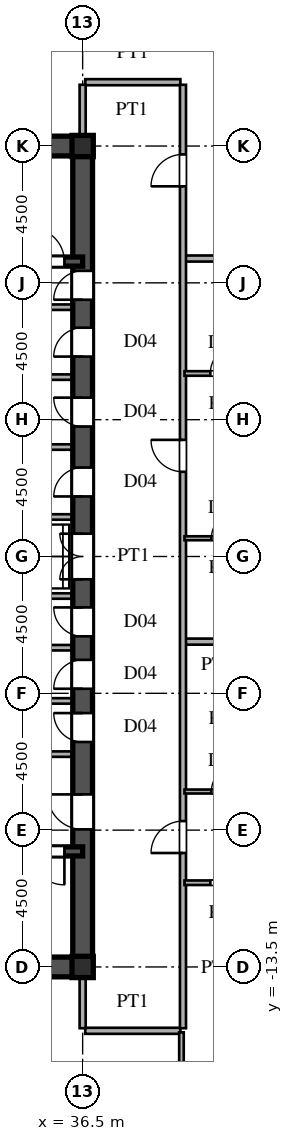
"""IFC4 building model, lengths in metres.
Left out: names, types, materials, properties, quantities, classifications, styles, units other than length and angle.
Written with IfcOpenShell. Run it as: python <this file> out.ifc"""

import sys

from ifc_helpers import new_model, si_unit, direction, frame, frame_2d, origin, origin_2d, place, context, subcontext, project, spatial, rectangle, i_section, extrude, source, transform, mapped, element, fill, save


model = new_model("IFC4")
c1 = context("Model", 3, precision=1e-05, world=origin(), true_north=direction((0.0, 1.0)))
c2 = subcontext(c1, "Body", "Model", "MODEL_VIEW")
j1 = project(units=[si_unit("LENGTHUNIT", "METRE"), si_unit("PLANEANGLEUNIT", "RADIAN")], contexts=[c1])
p1 = place(None, origin())
s1 = spatial("IfcSite", under=j1, at=p1, CompositionType="ELEMENT")
p2 = place(p1, origin())
s2 = spatial("IfcBuilding", under=s1, at=p2, CompositionType="ELEMENT")
p3 = place(p2, frame((0.0, 0.0, 121.2)))
s3 = spatial("IfcBuildingStorey", under=s2, at=p3, CompositionType="ELEMENT", Elevation=121.2)
m1 = source(origin(), c2, "Body", "SweptSolid", [
    extrude(i_section(OverallWidth=0.7, OverallDepth=0.7, WebThickness=0.028, FlangeThickness=0.045, at=origin_2d()), origin(), (0.0, 0.0, 1.0), 3.6),
])
for number, where, z_axis, x_axis in (
    (1, (36.5, -13.5, 0.0), (0.0, 0.0, 1.0), (1.0, 0.0, 0.0)),
    (2, (36.5, 13.5, 0.0), (0.0, 0.0, 1.0), (1.0, 0.0, 0.0)),
):
    element("IfcColumn", number, at=place(p3, frame(where, z_axis=z_axis, x_axis=x_axis)), inside=s3, PredefinedType="COLUMN", context=c2, shape_type="MappedRepresentation", body=[
        mapped(m1, transform((0.0, 0.0, 0.0), scale=1.0)),
    ])
for number, where, z_axis, x_axis in (
    (3, (27.5, -13.5, 0.0), (0.0, 0.0, 1.0), (1.0, 0.0, 0.0)),
    (4, (27.5, 13.5, 0.0), (0.0, 0.0, 1.0), (1.0, 0.0, 0.0)),
):
    element("IfcWall", number, at=place(p3, frame(where, z_axis=z_axis, x_axis=x_axis)), inside=s3, PredefinedType="SHEAR", context=c2, shape_type="SweptSolid", body=[
        extrude(rectangle(XDim=9.0, YDim=0.65, at=frame_2d((4.5, 0.0))), origin(), (0.0, 0.0, 1.0), 3.38),
    ])
p4 = place(p3, frame((36.5, -13.65, 0.0), z_axis=(0.0, 0.0, 1.0), x_axis=(0.0, 1.0, 0.0)))
e5 = element("IfcWall", 5, at=p4, inside=s3, PredefinedType="SHEAR", context=c2, shape_type="SweptSolid", body=[
    extrude(rectangle(XDim=7.15, YDim=0.65, at=frame_2d((3.575, 0.0))), origin(), (0.0, 0.0, 1.0), 3.38),
])
p5 = place(p4, frame((4.675, 0.0, 0.0)))
e6 = element("IfcOpeningElement", 6, at=p5, cuts=e5, PredefinedType="OPENING", context=c2, shape_type="SweptSolid", body=[
    extrude(rectangle(XDim=1.15, YDim=2.2, at=frame_2d((0.575, 1.1))), frame((0.0, 0.335, 0.0), z_axis=(0.0, -1.0, 0.0), x_axis=(1.0, 0.0, 0.0)), (0.0, 0.0, 1.0), 0.67),
])
p6 = place(p3, frame((36.5, -1.3, 0.0), z_axis=(0.0, 0.0, 1.0), x_axis=(0.0, 1.0, 0.0)))
e7 = element("IfcWall", 7, at=p6, inside=s3, PredefinedType="SHEAR", context=c2, shape_type="SweptSolid", body=[
    extrude(rectangle(XDim=2.6, YDim=0.65, at=frame_2d((1.3, 0.0))), origin(), (0.0, 0.0, 1.0), 3.38),
])
p7 = place(p6, frame((0.55, 0.0, 0.0)))
e8 = element("IfcOpeningElement", 8, at=p7, cuts=e7, PredefinedType="OPENING", context=c2, shape_type="SweptSolid", body=[
    extrude(rectangle(XDim=1.5, YDim=2.3, at=frame_2d((0.75, 1.15))), frame((0.0, 0.335, 0.0), z_axis=(0.0, -1.0, 0.0), x_axis=(1.0, 0.0, 0.0)), (0.0, 0.0, 1.0), 0.67),
])
p8 = place(p3, frame((36.5, 8.2, 0.0), z_axis=(0.0, 0.0, 1.0), x_axis=(0.0, 1.0, 0.0)))
e9 = element("IfcWall", 9, at=p8, inside=s3, PredefinedType="SHEAR", context=c2, shape_type="SweptSolid", body=[
    extrude(rectangle(XDim=5.45, YDim=0.65, at=frame_2d((2.725, 0.0))), origin(), (0.0, 0.0, 1.0), 3.38),
])
p9 = place(p8, frame((0.245, 0.0, 0.0)))
e10 = element("IfcOpeningElement", 10, at=p9, cuts=e9, PredefinedType="OPENING", context=c2, shape_type="SweptSolid", body=[
    extrude(rectangle(XDim=0.95, YDim=2.15, at=frame_2d((0.475, 1.075))), frame((0.0, 0.335, 0.0), z_axis=(0.0, -1.0, 0.0), x_axis=(1.0, 0.0, 0.0)), (0.0, 0.0, 1.0), 0.67),
])
p10 = place(p3, frame((36.5, -6.5, 0.0), z_axis=(0.0, 0.0, 1.0), x_axis=(0.0, 1.0, 0.0)))
e11 = element("IfcWall", 11, at=p10, inside=s3, PredefinedType="SHEAR", context=c2, shape_type="SweptSolid", body=[
    extrude(rectangle(XDim=1.75, YDim=0.65, at=frame_2d((0.875, 0.0))), origin(), (0.0, 0.0, 1.0), 3.38),
])
p11 = place(p10, frame((0.4, 0.0, 0.0)))
e12 = element("IfcOpeningElement", 12, at=p11, cuts=e11, PredefinedType="OPENING", context=c2, shape_type="SweptSolid", body=[
    extrude(rectangle(XDim=0.95, YDim=2.15, at=frame_2d((0.475, 1.075))), frame((0.0, 0.335, 0.0), z_axis=(0.0, -1.0, 0.0), x_axis=(1.0, 0.0, 0.0)), (0.0, 0.0, 1.0), 0.67),
])
p12 = place(p3, frame((36.5, -4.75, 0.0), z_axis=(0.0, 0.0, 1.0), x_axis=(0.0, 1.0, 0.0)))
e13 = element("IfcWall", 13, at=p12, inside=s3, PredefinedType="SHEAR", context=c2, shape_type="SweptSolid", body=[
    extrude(rectangle(XDim=1.75, YDim=0.65, at=frame_2d((0.875, 0.0))), origin(), (0.0, 0.0, 1.0), 3.38),
])
p13 = place(p12, frame((0.4, 0.0, 0.0)))
e14 = element("IfcOpeningElement", 14, at=p13, cuts=e13, PredefinedType="OPENING", context=c2, shape_type="SweptSolid", body=[
    extrude(rectangle(XDim=0.95, YDim=2.15, at=frame_2d((0.475, 1.075))), frame((0.0, 0.335, 0.0), z_axis=(0.0, -1.0, 0.0), x_axis=(1.0, 0.0, 0.0)), (0.0, 0.0, 1.0), 0.67),
])
p14 = place(p3, frame((36.5, -3.0, 0.0), z_axis=(0.0, 0.0, 1.0), x_axis=(0.0, 1.0, 0.0)))
e15 = element("IfcWall", 15, at=p14, inside=s3, PredefinedType="SHEAR", context=c2, shape_type="SweptSolid", body=[
    extrude(rectangle(XDim=1.7, YDim=0.65, at=frame_2d((0.85, 0.0))), origin(), (0.0, 0.0, 1.0), 3.38),
])
p15 = place(p14, frame((0.375, 0.0, 0.0)))
e16 = element("IfcOpeningElement", 16, at=p15, cuts=e15, PredefinedType="OPENING", context=c2, shape_type="SweptSolid", body=[
    extrude(rectangle(XDim=0.95, YDim=2.15, at=frame_2d((0.475, 1.075))), frame((0.0, 0.335, 0.0), z_axis=(0.0, -1.0, 0.0), x_axis=(1.0, 0.0, 0.0)), (0.0, 0.0, 1.0), 0.67),
])
p16 = place(p3, frame((36.5, 1.3, 0.0), z_axis=(0.0, 0.0, 1.0), x_axis=(0.0, 1.0, 0.0)))
e17 = element("IfcWall", 17, at=p16, inside=s3, PredefinedType="SHEAR", context=c2, shape_type="SweptSolid", body=[
    extrude(rectangle(XDim=2.3, YDim=0.65, at=frame_2d((1.15, 0.0))), origin(), (0.0, 0.0, 1.0), 3.38),
])
p17 = place(p16, frame((0.675, 0.0, 0.0)))
e18 = element("IfcOpeningElement", 18, at=p17, cuts=e17, PredefinedType="OPENING", context=c2, shape_type="SweptSolid", body=[
    extrude(rectangle(XDim=0.95, YDim=2.15, at=frame_2d((0.475, 1.075))), frame((0.0, 0.335, 0.0), z_axis=(0.0, -1.0, 0.0), x_axis=(1.0, 0.0, 0.0)), (0.0, 0.0, 1.0), 0.67),
])
p18 = place(p3, frame((36.5, 3.6, 0.0), z_axis=(0.0, 0.0, 1.0), x_axis=(0.0, 1.0, 0.0)))
e19 = element("IfcWall", 19, at=p18, inside=s3, PredefinedType="SHEAR", context=c2, shape_type="SweptSolid", body=[
    extrude(rectangle(XDim=2.3, YDim=0.65, at=frame_2d((1.15, 0.0))), origin(), (0.0, 0.0, 1.0), 3.38),
])
p19 = place(p18, frame((0.675, 0.0, 0.0)))
e20 = element("IfcOpeningElement", 20, at=p19, cuts=e19, PredefinedType="OPENING", context=c2, shape_type="SweptSolid", body=[
    extrude(rectangle(XDim=0.95, YDim=2.15, at=frame_2d((0.475, 1.075))), frame((0.0, 0.335, 0.0), z_axis=(0.0, -1.0, 0.0), x_axis=(1.0, 0.0, 0.0)), (0.0, 0.0, 1.0), 0.67),
])
p20 = place(p3, frame((36.5, 5.9, 0.0), z_axis=(0.0, 0.0, 1.0), x_axis=(0.0, 1.0, 0.0)))
e21 = element("IfcWall", 21, at=p20, inside=s3, PredefinedType="SHEAR", context=c2, shape_type="SweptSolid", body=[
    extrude(rectangle(XDim=2.3, YDim=0.65, at=frame_2d((1.15, 0.0))), origin(), (0.0, 0.0, 1.0), 3.38),
])
p21 = place(p20, frame((0.675, 0.0, 0.0)))
e22 = element("IfcOpeningElement", 22, at=p21, cuts=e21, PredefinedType="OPENING", context=c2, shape_type="SweptSolid", body=[
    extrude(rectangle(XDim=0.95, YDim=2.15, at=frame_2d((0.475, 1.075))), frame((0.0, 0.335, 0.0), z_axis=(0.0, -1.0, 0.0), x_axis=(1.0, 0.0, 0.0)), (0.0, 0.0, 1.0), 0.67),
])
p22 = place(p3, frame((27.5, -9.7, 0.0), z_axis=(0.0, 0.0, 1.0), x_axis=(1.0, 0.0, 0.0)))
e23 = element("IfcWall", 23, at=p22, inside=s3, PredefinedType="SHEAR", context=c2, shape_type="SweptSolid", body=[
    extrude(rectangle(XDim=9.0, YDim=0.3, at=frame_2d((4.5, 0.0))), origin(), (0.0, 0.0, 1.0), 3.38),
])
p23 = place(p22, frame((7.3, 0.0, 0.0)))
e24 = element("IfcOpeningElement", 24, at=p23, cuts=e23, PredefinedType="OPENING", context=c2, shape_type="SweptSolid", body=[
    extrude(rectangle(XDim=1.1, YDim=2.2, at=frame_2d((0.55, 1.1))), frame((0.0, 0.16, 0.0), z_axis=(0.0, -1.0, 0.0), x_axis=(1.0, 0.0, 0.0)), (0.0, 0.0, 1.0), 0.32),
])
p24 = place(p3, frame((27.5, 9.7, 0.0), z_axis=(0.0, 0.0, 1.0), x_axis=(1.0, 0.0, 0.0)))
e25 = element("IfcWall", 25, at=p24, inside=s3, PredefinedType="SHEAR", context=c2, shape_type="SweptSolid", body=[
    extrude(rectangle(XDim=9.0, YDim=0.3, at=frame_2d((4.5, 0.0))), origin(), (0.0, 0.0, 1.0), 3.38),
])
p25 = place(p24, frame((7.3, 0.0, 0.0)))
e26 = element("IfcOpeningElement", 26, at=p25, cuts=e25, PredefinedType="OPENING", context=c2, shape_type="SweptSolid", body=[
    extrude(rectangle(XDim=1.1, YDim=2.2, at=frame_2d((0.55, 1.1))), frame((0.0, 0.16, 0.0), z_axis=(0.0, -1.0, 0.0), x_axis=(1.0, 0.0, 0.0)), (0.0, 0.0, 1.0), 0.32),
])
for number, where, z_axis, x_axis in (
    (27, (30.45, -6.5, 0.0), (0.0, 0.0, 1.0), (1.0, 0.0, 0.0)),
    (28, (30.45, 8.2, 0.0), (0.0, 0.0, 1.0), (1.0, 0.0, 0.0)),
):
    element("IfcWall", number, at=place(p3, frame(where, z_axis=z_axis, x_axis=x_axis)), inside=s3, PredefinedType="PARTITIONING", context=c2, shape_type="SweptSolid", body=[
        extrude(rectangle(XDim=5.7, YDim=0.18, at=frame_2d((2.85, 0.0))), origin(), (0.0, 0.0, 1.0), 3.38),
    ])
for number, where, z_axis, x_axis in (
    (29, (33.2, -1.3, 0.0), (0.0, 0.0, 1.0), (1.0, 0.0, 0.0)),
    (30, (33.2, 1.3, 0.0), (0.0, 0.0, 1.0), (1.0, 0.0, 0.0)),
    (31, (33.2, -4.75, 0.0), (0.0, 0.0, 1.0), (1.0, 0.0, 0.0)),
    (32, (33.2, -3.0, 0.0), (0.0, 0.0, 1.0), (1.0, 0.0, 0.0)),
    (33, (33.2, 3.6, 0.0), (0.0, 0.0, 1.0), (1.0, 0.0, 0.0)),
    (34, (33.2, 5.9, 0.0), (0.0, 0.0, 1.0), (1.0, 0.0, 0.0)),
):
    element("IfcWall", number, at=place(p3, frame(where, z_axis=z_axis, x_axis=x_axis)), inside=s3, PredefinedType="PARTITIONING", context=c2, shape_type="SweptSolid", body=[
        extrude(rectangle(XDim=2.95, YDim=0.18, at=frame_2d((1.475, 0.0))), origin(), (0.0, 0.0, 1.0), 3.38),
    ])
p26 = place(p3, frame((36.585, -15.6, 0.0), z_axis=(0.0, 0.0, 1.0), x_axis=(1.0, 0.0, 0.0)))
e35 = element("IfcWall", 35, at=p26, inside=s3, PredefinedType="PARTITIONING", context=c2, shape_type="SweptSolid", body=[
    extrude(rectangle(XDim=3.13, YDim=0.2, at=frame_2d((1.565, 0.0))), origin(), (0.0, 0.0, 1.0), 3.38),
])
p27 = place(p3, frame((39.85, -10.73, 0.0), z_axis=(0.0, 0.0, 1.0), x_axis=(1.0, 0.0, 0.0)))
e36 = element("IfcWall", 36, at=p27, inside=s3, PredefinedType="PARTITIONING", context=c2, shape_type="SweptSolid", body=[
    extrude(rectangle(XDim=2.65, YDim=0.15, at=frame_2d((1.325, 0.0))), origin(), (0.0, 0.0, 1.0), 3.38),
])
p28 = place(p27, frame((0.85, 0.0, 0.0)))
e37 = element("IfcOpeningElement", 37, at=p28, cuts=e36, PredefinedType="OPENING", context=c2, shape_type="SweptSolid", body=[
    extrude(rectangle(XDim=0.95, YDim=2.15, at=frame_2d((0.475, 1.075))), frame((0.0, 0.085, 0.0), z_axis=(0.0, -1.0, 0.0), x_axis=(1.0, 0.0, 0.0)), (0.0, 0.0, 1.0), 0.17),
])
p29 = place(p3, frame((39.85, -7.73, 0.0), z_axis=(0.0, 0.0, 1.0), x_axis=(1.0, 0.0, 0.0)))
e38 = element("IfcWall", 38, at=p29, inside=s3, PredefinedType="PARTITIONING", context=c2, shape_type="SweptSolid", body=[
    extrude(rectangle(XDim=2.65, YDim=0.13, at=frame_2d((1.325, 0.0))), origin(), (0.0, 0.0, 1.0), 3.38),
])
p30 = place(p29, frame((0.885, 0.0, 0.0)))
e39 = element("IfcOpeningElement", 39, at=p30, cuts=e38, PredefinedType="OPENING", context=c2, shape_type="SweptSolid", body=[
    extrude(rectangle(XDim=0.88, YDim=2.1, at=frame_2d((0.44, 1.05))), frame((0.0, 0.075, 0.0), z_axis=(0.0, -1.0, 0.0), x_axis=(1.0, 0.0, 0.0)), (0.0, 0.0, 1.0), 0.15),
])
p31 = place(p3, frame((39.88, -2.8, 0.0), z_axis=(0.0, 0.0, 1.0), x_axis=(1.0, 0.0, 0.0)))
e40 = element("IfcWall", 40, at=p31, inside=s3, PredefinedType="PARTITIONING", context=c2, shape_type="SweptSolid", body=[
    extrude(rectangle(XDim=29.625, YDim=0.2, at=frame_2d((14.812, 0.0))), origin(), (0.0, 0.0, 1.0), 3.38),
])
p32 = place(p3, frame((39.85, 0.6, 0.0), z_axis=(0.0, 0.0, 1.0), x_axis=(1.0, 0.0, 0.0)))
e41 = element("IfcWall", 41, at=p32, inside=s3, PredefinedType="PARTITIONING", context=c2, shape_type="SweptSolid", body=[
    extrude(rectangle(XDim=2.65, YDim=0.13, at=frame_2d((1.325, 0.0))), origin(), (0.0, 0.0, 1.0), 3.38),
])
p33 = place(p32, frame((0.885, 0.0, 0.0)))
e42 = element("IfcOpeningElement", 42, at=p33, cuts=e41, PredefinedType="OPENING", context=c2, shape_type="SweptSolid", body=[
    extrude(rectangle(XDim=0.88, YDim=2.1, at=frame_2d((0.44, 1.05))), frame((0.0, 0.075, 0.0), z_axis=(0.0, -1.0, 0.0), x_axis=(1.0, 0.0, 0.0)), (0.0, 0.0, 1.0), 0.15),
])
p34 = place(p3, frame((39.85, 6.02, 0.0), z_axis=(0.0, 0.0, 1.0), x_axis=(1.0, 0.0, 0.0)))
e43 = element("IfcWall", 43, at=p34, inside=s3, PredefinedType="PARTITIONING", context=c2, shape_type="SweptSolid", body=[
    extrude(rectangle(XDim=2.65, YDim=0.15, at=frame_2d((1.325, 0.0))), origin(), (0.0, 0.0, 1.0), 3.38),
])
p35 = place(p34, frame((0.85, 0.0, 0.0)))
e44 = element("IfcOpeningElement", 44, at=p35, cuts=e43, PredefinedType="OPENING", context=c2, shape_type="SweptSolid", body=[
    extrude(rectangle(XDim=0.95, YDim=2.15, at=frame_2d((0.475, 1.075))), frame((0.0, 0.085, 0.0), z_axis=(0.0, -1.0, 0.0), x_axis=(1.0, 0.0, 0.0)), (0.0, 0.0, 1.0), 0.17),
])
p36 = place(p3, frame((39.88, 9.8, 0.0), z_axis=(0.0, 0.0, 1.0), x_axis=(1.0, 0.0, 0.0)))
e45 = element("IfcWall", 45, at=p36, inside=s3, PredefinedType="PARTITIONING", context=c2, shape_type="SweptSolid", body=[
    extrude(rectangle(XDim=20.277, YDim=0.2, at=frame_2d((10.139, 0.0))), origin(), (0.0, 0.0, 1.0), 3.38),
])
p37 = place(p3, frame((36.585, 15.6, 0.0), z_axis=(0.0, 0.0, 1.0), x_axis=(1.0, 0.0, 0.0)))
e46 = element("IfcWall", 46, at=p37, inside=s3, PredefinedType="PARTITIONING", context=c2, shape_type="SweptSolid", body=[
    extrude(rectangle(XDim=3.13, YDim=0.2, at=frame_2d((1.565, 0.0))), origin(), (0.0, 0.0, 1.0), 3.38),
])
for number, where, z_axis, x_axis in (
    (47, (36.5, -15.515, 0.0), (0.0, 0.0, 1.0), (0.0, 1.0, 0.0)),
    (48, (36.5, 13.83, 0.0), (0.0, 0.0, 1.0), (0.0, 1.0, 0.0)),
):
    element("IfcWall", number, at=place(p3, frame(where, z_axis=z_axis, x_axis=x_axis)), inside=s3, PredefinedType="PARTITIONING", context=c2, shape_type="SweptSolid", body=[
        extrude(rectangle(XDim=1.685, YDim=0.2, at=frame_2d((0.842, 0.0))), origin(), (0.0, 0.0, 1.0), 2.78),
    ])
p38 = place(p3, frame((39.75, -20.301, 0.0), z_axis=(0.0, 0.0, 1.0), x_axis=(0.0, 1.0, 0.0)))
e49 = element("IfcWall", 49, at=p38, inside=s3, PredefinedType="PARTITIONING", context=c2, shape_type="SweptSolid", body=[
    extrude(rectangle(XDim=4.651, YDim=0.15, at=frame_2d((2.326, 0.0))), origin(), (0.0, 0.0, 1.0), 3.38),
])
p39 = place(p38, frame((2.526, 0.0, 0.0)))
e50 = element("IfcOpeningElement", 50, at=p39, cuts=e49, PredefinedType="OPENING", context=c2, shape_type="SweptSolid", body=[
    extrude(rectangle(XDim=0.95, YDim=2.15, at=frame_2d((0.475, 1.075))), frame((0.0, 0.085, 0.0), z_axis=(0.0, -1.0, 0.0), x_axis=(1.0, 0.0, 0.0)), (0.0, 0.0, 1.0), 0.17),
])
p40 = place(p3, frame((39.8, -15.515, 0.0), z_axis=(0.0, 0.0, 1.0), x_axis=(0.0, 1.0, 0.0)))
e51 = element("IfcWall", 51, at=p40, inside=s3, PredefinedType="PARTITIONING", context=c2, shape_type="SweptSolid", body=[
    extrude(rectangle(XDim=31.03, YDim=0.2, at=frame_2d((15.515, 0.0))), origin(), (0.0, 0.0, 1.0), 3.38),
])
p41 = place(p40, frame((5.762, 0.0, 0.0)))
e52 = element("IfcOpeningElement", 52, at=p41, cuts=e51, PredefinedType="OPENING", context=c2, shape_type="SweptSolid", body=[
    extrude(rectangle(XDim=1.05, YDim=2.25, at=frame_2d((0.525, 1.125))), frame((0.0, 0.11, 0.0), z_axis=(0.0, -1.0, 0.0), x_axis=(1.0, 0.0, 0.0)), (0.0, 0.0, 1.0), 0.22),
])
p42 = place(p40, frame((18.301, 0.0, 0.0)))
e53 = element("IfcOpeningElement", 53, at=p42, cuts=e51, PredefinedType="OPENING", context=c2, shape_type="SweptSolid", body=[
    extrude(rectangle(XDim=1.05, YDim=2.25, at=frame_2d((0.525, 1.125))), frame((0.0, 0.11, 0.0), z_axis=(0.0, -1.0, 0.0), x_axis=(1.0, 0.0, 0.0)), (0.0, 0.0, 1.0), 0.22),
])
p43 = place(p40, frame((27.69, 0.0, 0.0)))
e54 = element("IfcOpeningElement", 54, at=p43, cuts=e51, PredefinedType="OPENING", context=c2, shape_type="SweptSolid", body=[
    extrude(rectangle(XDim=1.05, YDim=2.25, at=frame_2d((0.525, 1.125))), frame((0.0, 0.11, 0.0), z_axis=(0.0, -1.0, 0.0), x_axis=(1.0, 0.0, 0.0)), (0.0, 0.0, 1.0), 0.22),
])
m2 = source(origin(), c2, "Body", "SweptSolid", [
    extrude(rectangle(XDim=1.15, YDim=2.2, at=frame_2d((0.575, 1.1))), frame((0.0, 0.025, 0.0), z_axis=(0.0, -1.0, 0.0), x_axis=(1.0, 0.0, 0.0)), (0.0, 0.0, 1.0), 0.05),
])
p44 = place(p5, origin())
e55 = element("IfcDoor", 55, at=p44, inside=s3, OperationType="SINGLE_SWING_RIGHT", PredefinedType="DOOR", context=c2, shape_type="MappedRepresentation", body=[
    mapped(m2, transform((0.0, 0.0, 0.0), scale=1.0)),
])
fill(e6, e55)
m3 = source(origin(), c2, "Body", "SweptSolid", [
    extrude(rectangle(XDim=1.5, YDim=2.3, at=frame_2d((0.75, 1.15))), frame((0.0, 0.025, 0.0), z_axis=(0.0, -1.0, 0.0), x_axis=(1.0, 0.0, 0.0)), (0.0, 0.0, 1.0), 0.05),
])
p45 = place(p7, origin())
e56 = element("IfcDoor", 56, at=p45, inside=s3, OperationType="DOUBLE_SWING_LEFT", PredefinedType="DOOR", context=c2, shape_type="MappedRepresentation", body=[
    mapped(m3, transform((0.0, 0.0, 0.0), scale=1.0)),
])
fill(e8, e56)
m4 = source(origin(), c2, "Body", "SweptSolid", [
    extrude(rectangle(XDim=0.95, YDim=2.15, at=frame_2d((0.475, 1.075))), frame((0.0, 0.025, 0.0), z_axis=(0.0, -1.0, 0.0), x_axis=(1.0, 0.0, 0.0)), (0.0, 0.0, 1.0), 0.05),
])
p46 = place(p9, origin())
e57 = element("IfcDoor", 57, at=p46, inside=s3, OperationType="SINGLE_SWING_LEFT", PredefinedType="DOOR", context=c2, shape_type="MappedRepresentation", body=[
    mapped(m4, transform((0.0, 0.0, 0.0), scale=1.0)),
])
fill(e10, e57)
p47 = place(p11, origin())
e58 = element("IfcDoor", 58, at=p47, inside=s3, OperationType="SINGLE_SWING_RIGHT", PredefinedType="DOOR", context=c2, shape_type="MappedRepresentation", body=[
    mapped(m4, transform((0.0, 0.0, 0.0), scale=1.0)),
])
fill(e12, e58)
p48 = place(p13, origin())
e59 = element("IfcDoor", 59, at=p48, inside=s3, OperationType="SINGLE_SWING_LEFT", PredefinedType="DOOR", context=c2, shape_type="MappedRepresentation", body=[
    mapped(m4, transform((0.0, 0.0, 0.0), scale=1.0)),
])
fill(e14, e59)
p49 = place(p15, origin())
e60 = element("IfcDoor", 60, at=p49, inside=s3, OperationType="SINGLE_SWING_RIGHT", PredefinedType="DOOR", context=c2, shape_type="MappedRepresentation", body=[
    mapped(m4, transform((0.0, 0.0, 0.0), scale=1.0)),
])
fill(e16, e60)
p50 = place(p17, origin())
e61 = element("IfcDoor", 61, at=p50, inside=s3, OperationType="SINGLE_SWING_LEFT", PredefinedType="DOOR", context=c2, shape_type="MappedRepresentation", body=[
    mapped(m4, transform((0.0, 0.0, 0.0), scale=1.0)),
])
fill(e18, e61)
p51 = place(p19, origin())
e62 = element("IfcDoor", 62, at=p51, inside=s3, OperationType="SINGLE_SWING_RIGHT", PredefinedType="DOOR", context=c2, shape_type="MappedRepresentation", body=[
    mapped(m4, transform((0.0, 0.0, 0.0), scale=1.0)),
])
fill(e20, e62)
p52 = place(p21, origin())
e63 = element("IfcDoor", 63, at=p52, inside=s3, OperationType="SINGLE_SWING_LEFT", PredefinedType="DOOR", context=c2, shape_type="MappedRepresentation", body=[
    mapped(m4, transform((0.0, 0.0, 0.0), scale=1.0)),
])
fill(e22, e63)
m5 = source(origin(), c2, "Body", "SweptSolid", [
    extrude(rectangle(XDim=1.1, YDim=2.2, at=frame_2d((0.55, 1.1))), frame((0.0, 0.025, 0.0), z_axis=(0.0, -1.0, 0.0), x_axis=(1.0, 0.0, 0.0)), (0.0, 0.0, 1.0), 0.05),
])
p53 = place(p23, frame((1.1, 0.0, 0.0), z_axis=(0.0, 0.0, 1.0), x_axis=(-1.0, 0.0, 0.0)))
e64 = element("IfcDoor", 64, at=p53, inside=s3, OperationType="SINGLE_SWING_RIGHT", PredefinedType="DOOR", context=c2, shape_type="MappedRepresentation", body=[
    mapped(m5, transform((0.0, 0.0, 0.0), scale=1.0)),
])
fill(e24, e64)
p54 = place(p25, origin())
e65 = element("IfcDoor", 65, at=p54, inside=s3, OperationType="SINGLE_SWING_LEFT", PredefinedType="DOOR", context=c2, shape_type="MappedRepresentation", body=[
    mapped(m5, transform((0.0, 0.0, 0.0), scale=1.0)),
])
fill(e26, e65)
m6 = source(origin(), c2, "Body", "SweptSolid", [
    extrude(rectangle(XDim=0.88, YDim=2.1, at=frame_2d((0.44, 1.05))), frame((0.0, 0.025, 0.0), z_axis=(0.0, -1.0, 0.0), x_axis=(1.0, 0.0, 0.0)), (0.0, 0.0, 1.0), 0.05),
])
p55 = place(p30, origin())
e66 = element("IfcDoor", 66, at=p55, inside=s3, OperationType="SINGLE_SWING_RIGHT", PredefinedType="DOOR", context=c2, shape_type="MappedRepresentation", body=[
    mapped(m6, transform((0.0, 0.0, 0.0), scale=1.0)),
])
fill(e39, e66)
p56 = place(p33, origin())
e67 = element("IfcDoor", 67, at=p56, inside=s3, OperationType="SINGLE_SWING_RIGHT", PredefinedType="DOOR", context=c2, shape_type="MappedRepresentation", body=[
    mapped(m6, transform((0.0, 0.0, 0.0), scale=1.0)),
])
fill(e42, e67)
m7 = source(origin(), c2, "Body", "SweptSolid", [
    extrude(rectangle(XDim=0.95, YDim=2.15, at=frame_2d((0.475, 1.075))), frame((0.0, 0.025, 0.0), z_axis=(0.0, -1.0, 0.0), x_axis=(1.0, 0.0, 0.0)), (0.0, 0.0, 1.0), 0.05),
])
p57 = place(p35, origin())
e68 = element("IfcDoor", 68, at=p57, inside=s3, OperationType="SINGLE_SWING_RIGHT", PredefinedType="DOOR", context=c2, shape_type="MappedRepresentation", body=[
    mapped(m7, transform((0.0, 0.0, 0.0), scale=1.0)),
])
fill(e44, e68)
m8 = source(origin(), c2, "Body", "SweptSolid", [
    extrude(rectangle(XDim=1.05, YDim=2.25, at=frame_2d((0.525, 1.125))), frame((0.0, 0.025, 0.0), z_axis=(0.0, -1.0, 0.0), x_axis=(1.0, 0.0, 0.0)), (0.0, 0.0, 1.0), 0.05),
])
p58 = place(p41, origin())
e69 = element("IfcDoor", 69, at=p58, inside=s3, OperationType="SINGLE_SWING_LEFT", PredefinedType="DOOR", context=c2, shape_type="MappedRepresentation", body=[
    mapped(m8, transform((0.0, 0.0, 0.0), scale=1.0)),
])
fill(e52, e69)
p59 = place(p42, origin())
e70 = element("IfcDoor", 70, at=p59, inside=s3, OperationType="SINGLE_SWING_RIGHT", PredefinedType="DOOR", context=c2, shape_type="MappedRepresentation", body=[
    mapped(m8, transform((0.0, 0.0, 0.0), scale=1.0)),
])
fill(e53, e70)
p60 = place(p43, origin())
e71 = element("IfcDoor", 71, at=p60, inside=s3, OperationType="SINGLE_SWING_LEFT", PredefinedType="DOOR", context=c2, shape_type="MappedRepresentation", body=[
    mapped(m8, transform((0.0, 0.0, 0.0), scale=1.0)),
])
fill(e54, e71)
save(model, sys.argv[1])
